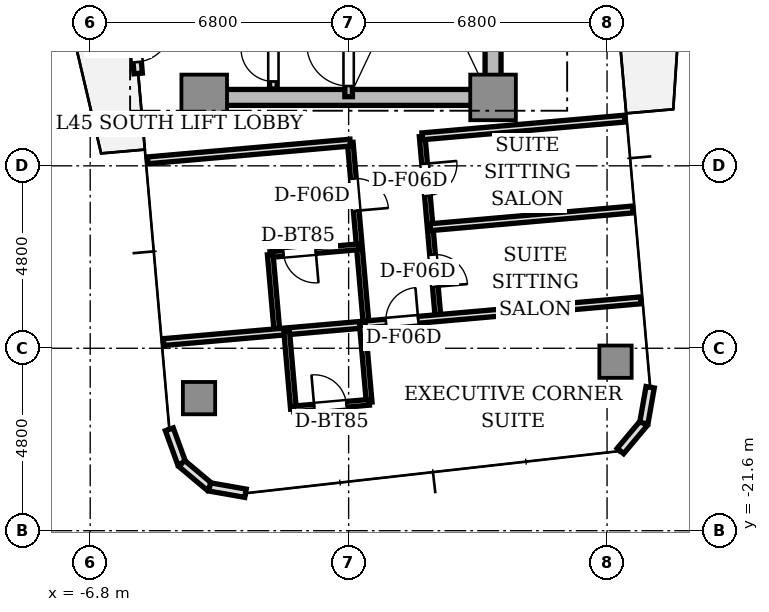
"""IFC4 building model, lengths in metres.
Left out: names, types, materials, properties, quantities, classifications, styles, units other than length and angle.
Written with IfcOpenShell. Run it as: python <this file> out.ifc"""

import sys

from ifc_helpers import new_model, si_unit, direction, frame, frame_2d, origin, origin_2d, place, context, subcontext, project, spatial, rectangle, extrude, source, transform, mapped, element, fill, save


model = new_model("IFC4")
c1 = context("Model", 3, precision=1e-05, world=origin(), true_north=direction((0.0, 1.0)))
c2 = subcontext(c1, "Body", "Model", "MODEL_VIEW")
j1 = project(units=[si_unit("LENGTHUNIT", "METRE"), si_unit("PLANEANGLEUNIT", "RADIAN")], contexts=[c1])
p1 = place(None, origin())
s1 = spatial("IfcSite", under=j1, at=p1, CompositionType="ELEMENT")
p2 = place(p1, origin())
s2 = spatial("IfcBuilding", under=s1, at=p2, CompositionType="ELEMENT")
p3 = place(p2, frame((0.0, 0.0, 164.0)))
s3 = spatial("IfcBuildingStorey", under=s2, at=p3, CompositionType="ELEMENT", Elevation=164.0)
p4 = place(p3, frame((-3.55, -10.2, 0.0), z_axis=(0.0, 0.0, 1.0), x_axis=(1.0, 0.0, 0.0)))
e1 = element("IfcWall", 1, at=p4, inside=s3, PredefinedType="SHEAR", context=c2, shape_type="SweptSolid", body=[
    extrude(rectangle(XDim=7.1, YDim=0.42, at=frame_2d((3.55, 0.0))), origin(), (0.0, 0.0, 1.0), 3.11),
])
p5 = place(p3, frame((3.8, -9.75, 0.0), z_axis=(0.0, 0.0, 1.0), x_axis=(0.0, 1.0, 0.0)))
e2 = element("IfcWall", 2, at=p5, inside=s3, PredefinedType="SHEAR", context=c2, shape_type="SweptSolid", body=[
    extrude(rectangle(XDim=6.9, YDim=0.42, at=frame_2d((3.45, 0.0))), origin(), (0.0, 0.0, 1.0), 3.11),
])
m1 = source(origin(), c2, "Body", "SweptSolid", [
    extrude(rectangle(XDim=1.2, YDim=1.2, at=origin_2d()), origin(), (0.0, 0.0, 1.0), 3.11),
])
for number, where, z_axis, x_axis in (
    (3, (-3.8, -10.2, 0.0), (0.0, 0.0, 1.0), (1.0, 0.0, 0.0)),
    (4, (3.8, -10.2, 0.0), (0.0, 0.0, 1.0), (1.0, 0.0, 0.0)),
):
    element("IfcColumn", number, at=place(p3, frame(where, z_axis=z_axis, x_axis=x_axis)), inside=s3, PredefinedType="COLUMN", context=c2, shape_type="MappedRepresentation", body=[
        mapped(m1, transform((0.0, 0.0, 0.0), scale=1.0)),
    ])
m2 = source(origin(), c2, "Body", "SweptSolid", [
    extrude(rectangle(XDim=0.85, YDim=0.85, at=origin_2d()), origin(), (0.0, 0.0, 1.0), 3.11),
])
for number, where, z_axis, x_axis in (
    (5, (-3.936, -18.112, 0.0), (0.0, 0.0, 1.0), (1.0, 0.0, 0.0)),
    (6, (7.022, -17.153, 0.0), (0.0, 0.0, 1.0), (1.0, 0.0, 0.0)),
):
    element("IfcColumn", number, at=place(p3, frame(where, z_axis=z_axis, x_axis=x_axis)), inside=s3, PredefinedType="COLUMN", context=c2, shape_type="MappedRepresentation", body=[
        mapped(m2, transform((0.0, 0.0, 0.0), scale=1.0)),
    ])
p6 = place(p3, frame((-5.772, -6.879, 0.0), z_axis=(0.0, 0.0, 1.0), x_axis=(0.087168071984, -0.996193619346, 0.0)))
e7 = element("IfcWall", 7, at=p6, inside=s3, PredefinedType="STANDARD", context=c2, shape_type="SweptSolid", body=[
    extrude(rectangle(XDim=2.7, YDim=0.22, at=frame_2d((1.35, 0.0))), origin(), (0.0, 0.0, 1.0), 3.11),
])
p7 = place(p6, frame((1.4, 0.0, 0.0)))
e8 = element("IfcOpeningElement", 8, at=p7, cuts=e7, PredefinedType="OPENING", context=c2, shape_type="SweptSolid", body=[
    extrude(rectangle(XDim=1.0, YDim=2.2, at=frame_2d((0.5, 1.1))), frame((0.0, 0.12, 0.0), z_axis=(0.0, -1.0, 0.0), x_axis=(1.0, 0.0, 0.0)), (0.0, 0.0, 1.0), 0.24),
])
p8 = place(p3, frame((-4.718, -18.933, 0.0), z_axis=(0.0, 0.0, 1.0), x_axis=(0.34188635151, -0.939741306239, 0.0)))
e9 = element("IfcWall", 9, at=p8, inside=s3, PredefinedType="STANDARD", context=c2, shape_type="SweptSolid", body=[
    extrude(rectangle(XDim=0.958, YDim=0.22, at=frame_2d((0.479, 0.0))), origin(), (0.0, 0.0, 1.0), 3.11),
])
for number, where, z_axis, x_axis in (
    (10, (-4.39, -19.833, 0.0), (0.0, 0.0, 1.0), (0.766, -0.643, 0.0)),
    (11, (-3.657, -20.449, 0.0), (0.0, 0.0, 1.0), (0.985, -0.174, 0.0)),
):
    element("IfcWall", number, at=place(p3, frame(where, z_axis=z_axis, x_axis=x_axis)), inside=s3, PredefinedType="STANDARD", context=c2, shape_type="SweptSolid", body=[
        extrude(rectangle(XDim=0.958, YDim=0.22, at=frame_2d((0.479, 0.0))), origin(), (0.0, 0.0, 1.0), 3.11),
    ])
for number, where, z_axis, x_axis in (
    (12, (7.152, -19.503, 0.0), (0.0, 0.0, 1.0), (0.643, 0.766, 0.0)),
    (13, (7.768, -18.769, 0.0), (0.0, 0.0, 1.0), (0.174, 0.985, 0.0)),
):
    element("IfcWall", number, at=place(p3, frame(where, z_axis=z_axis, x_axis=x_axis)), inside=s3, PredefinedType="STANDARD", context=c2, shape_type="SweptSolid", body=[
        extrude(rectangle(XDim=0.958, YDim=0.22, at=frame_2d((0.479, 0.0))), origin(), (0.0, 0.0, 1.0), 3.11),
    ])
p9 = place(p3, frame((0.0, -10.18, 0.0), z_axis=(0.0, 0.0, 1.0), x_axis=(0.0, 1.0, 0.0)))
e14 = element("IfcWall", 14, at=p9, inside=s3, PredefinedType="SOLIDWALL", context=c2, shape_type="SweptSolid", body=[
    extrude(rectangle(XDim=7.68, YDim=0.2, at=frame_2d((3.84, 0.0))), origin(), (0.0, 0.0, 1.0), 3.11),
])
p10 = place(p9, frame((0.28, 0.0, 0.0)))
e15 = element("IfcOpeningElement", 15, at=p10, cuts=e14, PredefinedType="OPENING", context=c2, shape_type="SweptSolid", body=[
    extrude(rectangle(XDim=1.1, YDim=2.15, at=frame_2d((0.55, 1.075))), frame((0.0, 0.11, 0.0), z_axis=(0.0, -1.0, 0.0), x_axis=(1.0, 0.0, 0.0)), (0.0, 0.0, 1.0), 0.22),
])
p11 = place(p3, frame((-1.98, -9.98, 0.0), z_axis=(0.0, 0.0, 1.0), x_axis=(0.0, 1.0, 0.0)))
e16 = element("IfcWall", 16, at=p11, inside=s3, PredefinedType="SOLIDWALL", context=c2, shape_type="SweptSolid", body=[
    extrude(rectangle(XDim=4.66, YDim=0.2, at=frame_2d((2.33, 0.0))), origin(), (0.0, 0.0, 1.0), 2.66),
])
p12 = place(p11, frame((0.2, 0.0, 0.0)))
e17 = element("IfcOpeningElement", 17, at=p12, cuts=e16, PredefinedType="OPENING", context=c2, shape_type="SweptSolid", body=[
    extrude(rectangle(XDim=0.85, YDim=2.1, at=frame_2d((0.425, 1.05))), frame((0.0, 0.11, 0.0), z_axis=(0.0, -1.0, 0.0), x_axis=(1.0, 0.0, 0.0)), (0.0, 0.0, 1.0), 0.22),
])
p13 = place(p3, frame((1.936, -11.224, 0.0), z_axis=(0.0, 0.0, 1.0), x_axis=(0.087182724829, -0.996192337097, 0.0)))
e18 = element("IfcWall", 18, at=p13, inside=s3, PredefinedType="PARTITIONING", context=c2, shape_type="SweptSolid", body=[
    extrude(rectangle(XDim=4.8, YDim=0.15, at=frame_2d((2.4, 0.0))), origin(), (0.0, 0.0, 1.0), 2.66),
])
p14 = place(p13, frame((0.725, 0.0, 0.0)))
e19 = element("IfcOpeningElement", 19, at=p14, cuts=e18, PredefinedType="OPENING", context=c2, shape_type="SweptSolid", body=[
    extrude(rectangle(XDim=0.85, YDim=2.1, at=frame_2d((0.425, 1.05))), frame((0.0, 0.085, 0.0), z_axis=(0.0, -1.0, 0.0), x_axis=(1.0, 0.0, 0.0)), (0.0, 0.0, 1.0), 0.17),
])
p15 = place(p13, frame((3.125, 0.0, 0.0)))
e20 = element("IfcOpeningElement", 20, at=p15, cuts=e18, PredefinedType="OPENING", context=c2, shape_type="SweptSolid", body=[
    extrude(rectangle(XDim=0.85, YDim=2.1, at=frame_2d((0.425, 1.05))), frame((0.0, 0.085, 0.0), z_axis=(0.0, -1.0, 0.0), x_axis=(1.0, 0.0, 0.0)), (0.0, 0.0, 1.0), 0.17),
])
p16 = place(p3, frame((0.043, -11.39, 0.0), z_axis=(0.0, 0.0, 1.0), x_axis=(0.087178307383, -0.996192723684, 0.0)))
e21 = element("IfcWall", 21, at=p16, inside=s3, PredefinedType="PARTITIONING", context=c2, shape_type="SweptSolid", body=[
    extrude(rectangle(XDim=4.8, YDim=0.15, at=frame_2d((2.4, 0.0))), origin(), (0.0, 0.0, 1.0), 2.66),
])
p17 = place(p16, frame((0.95, 0.0, 0.0)))
e22 = element("IfcOpeningElement", 22, at=p17, cuts=e21, PredefinedType="OPENING", context=c2, shape_type="SweptSolid", body=[
    extrude(rectangle(XDim=0.85, YDim=2.1, at=frame_2d((0.425, 1.05))), frame((0.0, 0.085, 0.0), z_axis=(0.0, -1.0, 0.0), x_axis=(1.0, 0.0, 0.0)), (0.0, 0.0, 1.0), 0.17),
])
for number, where, z_axis, x_axis in (
    (23, (1.936, -11.224, 0.0), (0.0, 0.0, 1.0), (0.996, 0.087, 0.0)),
    (24, (-5.287, -11.856, 0.0), (0.0, 0.0, 1.0), (0.996, 0.087, 0.0)),
    (25, (2.145, -13.615, 0.0), (0.0, 0.0, 1.0), (0.996, 0.087, 0.0)),
):
    element("IfcWall", number, at=place(p3, frame(where, z_axis=z_axis, x_axis=x_axis)), inside=s3, PredefinedType="PARTITIONING", context=c2, shape_type="SweptSolid", body=[
        extrude(rectangle(XDim=5.35, YDim=0.18, at=frame_2d((2.675, 0.0))), origin(), (0.0, 0.0, 1.0), 2.66),
    ])
p18 = place(p3, frame((0.282, -14.129, 0.0), z_axis=(0.0, 0.0, 1.0), x_axis=(-0.996197656711, -0.087121918963, 0.0)))
e26 = element("IfcWall", 26, at=p18, inside=s3, PredefinedType="PARTITIONING", context=c2, shape_type="SweptSolid", body=[
    extrude(rectangle(XDim=2.354, YDim=0.15, at=frame_2d((1.177, 0.0))), origin(), (0.0, 0.0, 1.0), 2.66),
])
p19 = place(p18, frame((1.154, 0.0, 0.0)))
e27 = element("IfcOpeningElement", 27, at=p19, cuts=e26, PredefinedType="OPENING", context=c2, shape_type="SweptSolid", body=[
    extrude(rectangle(XDim=0.85, YDim=2.1, at=frame_2d((0.425, 1.05))), frame((0.0, 0.085, 0.0), z_axis=(0.0, -1.0, 0.0), x_axis=(1.0, 0.0, 0.0)), (0.0, 0.0, 1.0), 0.17),
])
p20 = place(p3, frame((-2.062, -14.334, 0.0), z_axis=(0.0, 0.0, 1.0), x_axis=(0.087174336889, -0.99619307114, 0.0)))
e28 = element("IfcWall", 28, at=p20, inside=s3, PredefinedType="PARTITIONING", context=c2, shape_type="SweptSolid", body=[
    extrude(rectangle(XDim=2.05, YDim=0.15, at=frame_2d((1.025, 0.0))), origin(), (0.0, 0.0, 1.0), 2.66),
])
p21 = place(p3, frame((-4.868, -16.638, 0.0), z_axis=(0.0, 0.0, 1.0), x_axis=(0.996194790044, 0.087154691724, 0.0)))
e29 = element("IfcWall", 29, at=p21, inside=s3, PredefinedType="PARTITIONING", context=c2, shape_type="SweptSolid", body=[
    extrude(rectangle(XDim=12.6, YDim=0.18, at=frame_2d((6.3, 0.0))), origin(), (0.0, 0.0, 1.0), 2.66),
])
p22 = place(p21, frame((5.875, 0.0, 0.0)))
e30 = element("IfcOpeningElement", 30, at=p22, cuts=e29, PredefinedType="OPENING", context=c2, shape_type="SweptSolid", body=[
    extrude(rectangle(XDim=0.85, YDim=2.1, at=frame_2d((0.425, 1.05))), frame((0.0, 0.1, 0.0), z_axis=(0.0, -1.0, 0.0), x_axis=(1.0, 0.0, 0.0)), (0.0, 0.0, 1.0), 0.2),
])
p23 = place(p3, frame((0.362, -16.18, 0.0), z_axis=(0.0, 0.0, 1.0), x_axis=(0.087174336889, -0.99619307114, 0.0)))
e31 = element("IfcWall", 31, at=p23, inside=s3, PredefinedType="PARTITIONING", context=c2, shape_type="SweptSolid", body=[
    extrude(rectangle(XDim=2.05, YDim=0.15, at=frame_2d((1.025, 0.0))), origin(), (0.0, 0.0, 1.0), 2.66),
])
p24 = place(p3, frame((-1.631, -16.354, 0.0), z_axis=(0.0, 0.0, 1.0), x_axis=(0.087184680235, -0.996192165966, 0.0)))
e32 = element("IfcWall", 32, at=p24, inside=s3, PredefinedType="PARTITIONING", context=c2, shape_type="SweptSolid", body=[
    extrude(rectangle(XDim=2.05, YDim=0.15, at=frame_2d((1.025, 0.0))), origin(), (0.0, 0.0, 1.0), 2.66),
])
p25 = place(p3, frame((-1.452, -18.396, 0.0), z_axis=(0.0, 0.0, 1.0), x_axis=(0.996205236158, 0.087035208109, 0.0)))
e33 = element("IfcWall", 33, at=p25, inside=s3, PredefinedType="PARTITIONING", context=c2, shape_type="SweptSolid", body=[
    extrude(rectangle(XDim=2.0, YDim=0.15, at=frame_2d((1.0, 0.0))), origin(), (0.0, 0.0, 1.0), 2.66),
])
p26 = place(p25, frame((0.55, 0.0, 0.0)))
e34 = element("IfcOpeningElement", 34, at=p26, cuts=e33, PredefinedType="OPENING", context=c2, shape_type="SweptSolid", body=[
    extrude(rectangle(XDim=0.85, YDim=2.1, at=frame_2d((0.425, 1.05))), frame((0.0, 0.085, 0.0), z_axis=(0.0, -1.0, 0.0), x_axis=(1.0, 0.0, 0.0)), (0.0, 0.0, 1.0), 0.17),
])
m3 = source(origin(), c2, "Body", "SweptSolid", [
    extrude(rectangle(XDim=1.0, YDim=0.05, at=origin_2d()), origin(), (0.0, 0.0, 1.0), 2.2),
])
p27 = place(p7, frame((0.5, 0.0, 0.0)))
e35 = element("IfcDoor", 35, at=p27, inside=s3, OperationType="SINGLE_SWING_LEFT", PredefinedType="DOOR", context=c2, shape_type="MappedRepresentation", body=[
    mapped(m3, transform((0.0, 0.0, 0.0), scale=1.0)),
])
fill(e8, e35)
m4 = source(origin(), c2, "Body", "SweptSolid", [
    extrude(rectangle(XDim=1.1, YDim=0.05, at=origin_2d()), origin(), (0.0, 0.0, 1.0), 2.15),
])
p28 = place(p10, frame((0.55, 0.0, 0.0)))
e36 = element("IfcDoor", 36, at=p28, inside=s3, OperationType="SINGLE_SWING_RIGHT", PredefinedType="DOOR", context=c2, shape_type="MappedRepresentation", body=[
    mapped(m4, transform((0.0, 0.0, 0.0), scale=1.0)),
])
fill(e15, e36)
m5 = source(origin(), c2, "Body", "SweptSolid", [
    extrude(rectangle(XDim=0.85, YDim=0.05, at=origin_2d()), origin(), (0.0, 0.0, 1.0), 2.1),
])
p29 = place(p12, frame((0.425, 0.0, 0.0)))
e37 = element("IfcDoor", 37, at=p29, inside=s3, OperationType="SINGLE_SWING_RIGHT", PredefinedType="DOOR", context=c2, shape_type="MappedRepresentation", body=[
    mapped(m5, transform((0.0, 0.0, 0.0), scale=1.0)),
])
fill(e17, e37)
p30 = place(p14, frame((0.425, 0.0, 0.0)))
e38 = element("IfcDoor", 38, at=p30, inside=s3, OperationType="SINGLE_SWING_LEFT", PredefinedType="DOOR", context=c2, shape_type="MappedRepresentation", body=[
    mapped(m5, transform((0.0, 0.0, 0.0), scale=1.0)),
])
fill(e19, e38)
p31 = place(p15, frame((0.425, 0.0, 0.0)))
e39 = element("IfcDoor", 39, at=p31, inside=s3, OperationType="SINGLE_SWING_RIGHT", PredefinedType="DOOR", context=c2, shape_type="MappedRepresentation", body=[
    mapped(m5, transform((0.0, 0.0, 0.0), scale=1.0)),
])
fill(e20, e39)
p32 = place(p19, frame((0.425, 0.0, 0.0)))
e40 = element("IfcDoor", 40, at=p32, inside=s3, OperationType="SINGLE_SWING_LEFT", PredefinedType="DOOR", context=c2, shape_type="MappedRepresentation", body=[
    mapped(m5, transform((0.0, 0.0, 0.0), scale=1.0)),
])
fill(e27, e40)
p33 = place(p17, frame((0.425, 0.0, 0.0)))
e41 = element("IfcDoor", 41, at=p33, inside=s3, OperationType="SINGLE_SWING_RIGHT", PredefinedType="DOOR", context=c2, shape_type="MappedRepresentation", body=[
    mapped(m5, transform((0.0, 0.0, 0.0), scale=1.0)),
])
fill(e22, e41)
p34 = place(p26, frame((0.425, 0.0, 0.0)))
e42 = element("IfcDoor", 42, at=p34, inside=s3, OperationType="SINGLE_SWING_LEFT", PredefinedType="DOOR", context=c2, shape_type="MappedRepresentation", body=[
    mapped(m5, transform((0.0, 0.0, 0.0), scale=1.0)),
])
fill(e34, e42)
p35 = place(p22, frame((0.425, 0.0, 0.0)))
e43 = element("IfcDoor", 43, at=p35, inside=s3, OperationType="SINGLE_SWING_RIGHT", PredefinedType="DOOR", context=c2, shape_type="MappedRepresentation", body=[
    mapped(m5, transform((0.0, 0.0, 0.0), scale=1.0)),
])
fill(e30, e43)
save(model, sys.argv[1])
